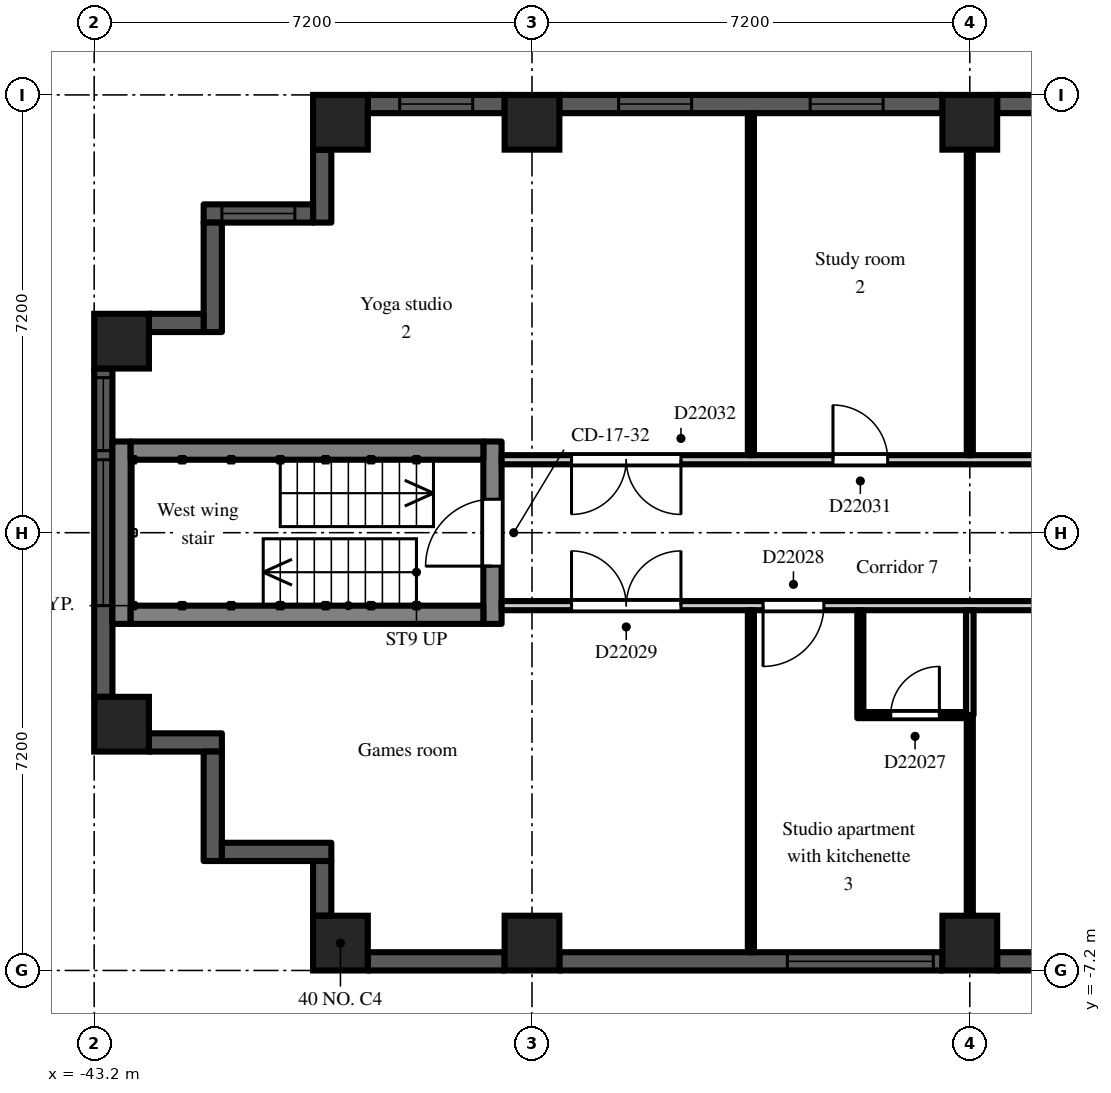
"""IFC4 building model, lengths in metres.
Left out: names, types, materials, properties, quantities, classifications, styles, units other than length and angle.
Written with IfcOpenShell. Run it as: python <this file> out.ifc"""

import sys

from ifc_helpers import new_model, si_unit, direction, frame, frame_2d, origin, origin_2d, place, context, subcontext, project, spatial, rectangle, extrude, element, fill, save


model = new_model("IFC4")
c1 = context("Model", 3, precision=1e-05, world=origin(), true_north=direction((0.0, 1.0)))
c2 = subcontext(c1, "Body", "Model", "MODEL_VIEW")
j1 = project(units=[si_unit("LENGTHUNIT", "METRE"), si_unit("PLANEANGLEUNIT", "RADIAN")], contexts=[c1])
p1 = place(None, origin())
s1 = spatial("IfcSite", under=j1, at=p1, CompositionType="ELEMENT")
p2 = place(p1, origin())
s2 = spatial("IfcBuilding", under=s1, at=p2, CompositionType="ELEMENT")
p3 = place(p2, frame((0.0, 0.0, 156.3)))
s3 = spatial("IfcBuildingStorey", under=s2, at=p3, CompositionType="ELEMENT", Elevation=156.3)
for number, where, z_axis, x_axis in (
    (1, (-42.75, -3.15, 0.0), (0.0, 0.0, 1.0), (1.0, 0.0, 0.0)),
    (2, (-42.75, 3.15, 0.0), (0.0, 0.0, 1.0), (1.0, 0.0, 0.0)),
    (3, (-39.15, -6.75, 0.0), (0.0, 0.0, 1.0), (1.0, 0.0, 0.0)),
    (4, (-39.15, 6.75, 0.0), (0.0, 0.0, 1.0), (1.0, 0.0, 0.0)),
    (5, (-36.0, -6.75, 0.0), (0.0, 0.0, 1.0), (1.0, 0.0, 0.0)),
    (6, (-36.0, 6.75, 0.0), (0.0, 0.0, 1.0), (1.0, 0.0, 0.0)),
    (7, (-28.8, -6.75, 0.0), (0.0, 0.0, 1.0), (1.0, 0.0, 0.0)),
    (8, (-28.8, 6.75, 0.0), (0.0, 0.0, 1.0), (1.0, 0.0, 0.0)),
):
    element("IfcColumn", number, at=place(p3, frame(where, z_axis=z_axis, x_axis=x_axis)), inside=s3, PredefinedType="COLUMN", context=c2, shape_type="SweptSolid", body=[
        extrude(rectangle(XDim=0.9, YDim=0.9, at=origin_2d()), origin(), (0.0, 0.0, 1.0), 3.0),
    ])
p4 = place(p3, frame((-25.2, 7.05, 0.0), z_axis=(0.0, 0.0, 1.0), x_axis=(-1.0, 0.0, 0.0)))
e9 = element("IfcWall", 9, at=p4, inside=s3, PredefinedType="SOLIDWALL", context=c2, shape_type="SweptSolid", body=[
    extrude(rectangle(XDim=3.15, YDim=0.3, at=frame_2d((1.575, 0.0))), origin(), (0.0, 0.0, 1.0), 2.2),
])
p5 = place(p4, frame((0.975, 0.0, 0.2)))
e10 = element("IfcOpeningElement", 10, at=p5, cuts=e9, PredefinedType="OPENING", context=c2, shape_type="SweptSolid", body=[
    extrude(rectangle(XDim=1.2, YDim=1.85, at=frame_2d((0.6, 0.925))), frame((0.0, 0.16, 0.0), z_axis=(0.0, -1.0, 0.0), x_axis=(1.0, 0.0, 0.0)), (0.0, 0.0, 1.0), 0.32),
])
p6 = place(p3, frame((-29.25, 7.05, 0.0), z_axis=(0.0, 0.0, 1.0), x_axis=(-1.0, 0.0, 0.0)))
e11 = element("IfcWall", 11, at=p6, inside=s3, PredefinedType="SOLIDWALL", context=c2, shape_type="SweptSolid", body=[
    extrude(rectangle(XDim=6.3, YDim=0.3, at=frame_2d((3.15, 0.0))), origin(), (0.0, 0.0, 1.0), 2.2),
])
p7 = place(p6, frame((0.975, 0.0, 0.2)))
e12 = element("IfcOpeningElement", 12, at=p7, cuts=e11, PredefinedType="OPENING", context=c2, shape_type="SweptSolid", body=[
    extrude(rectangle(XDim=1.2, YDim=1.85, at=frame_2d((0.6, 0.925))), frame((0.0, 0.16, 0.0), z_axis=(0.0, -1.0, 0.0), x_axis=(1.0, 0.0, 0.0)), (0.0, 0.0, 1.0), 0.32),
])
p8 = place(p6, frame((4.125, 0.0, 0.2)))
e13 = element("IfcOpeningElement", 13, at=p8, cuts=e11, PredefinedType="OPENING", context=c2, shape_type="SweptSolid", body=[
    extrude(rectangle(XDim=1.2, YDim=1.85, at=frame_2d((0.6, 0.925))), frame((0.0, 0.16, 0.0), z_axis=(0.0, -1.0, 0.0), x_axis=(1.0, 0.0, 0.0)), (0.0, 0.0, 1.0), 0.32),
])
p9 = place(p3, frame((-36.45, 7.05, 0.0), z_axis=(0.0, 0.0, 1.0), x_axis=(-1.0, 0.0, 0.0)))
e14 = element("IfcWall", 14, at=p9, inside=s3, PredefinedType="SOLIDWALL", context=c2, shape_type="SweptSolid", body=[
    extrude(rectangle(XDim=2.25, YDim=0.3, at=frame_2d((1.125, 0.0))), origin(), (0.0, 0.0, 1.0), 2.2),
])
p10 = place(p9, frame((0.525, 0.0, 0.2)))
e15 = element("IfcOpeningElement", 15, at=p10, cuts=e14, PredefinedType="OPENING", context=c2, shape_type="SweptSolid", body=[
    extrude(rectangle(XDim=1.2, YDim=1.85, at=frame_2d((0.6, 0.925))), frame((0.0, 0.16, 0.0), z_axis=(0.0, -1.0, 0.0), x_axis=(1.0, 0.0, 0.0)), (0.0, 0.0, 1.0), 0.32),
])
p11 = place(p3, frame((-39.45, 6.3, 0.0), z_axis=(0.0, 0.0, 1.0), x_axis=(0.0, -1.0, 0.0)))
e16 = element("IfcWall", 16, at=p11, inside=s3, PredefinedType="SOLIDWALL", context=c2, shape_type="SweptSolid", body=[
    extrude(rectangle(XDim=1.2, YDim=0.3, at=frame_2d((0.6, 0.0))), origin(), (0.0, 0.0, 1.0), 2.6),
])
p12 = place(p3, frame((-39.6, 5.25, 0.0), z_axis=(0.0, 0.0, 1.0), x_axis=(-1.0, 0.0, 0.0)))
e17 = element("IfcWall", 17, at=p12, inside=s3, PredefinedType="SOLIDWALL", context=c2, shape_type="SweptSolid", body=[
    extrude(rectangle(XDim=1.8, YDim=0.3, at=frame_2d((0.9, 0.0))), origin(), (0.0, 0.0, 1.0), 2.6),
])
p13 = place(p12, frame((0.3, 0.0, 0.2)))
e18 = element("IfcOpeningElement", 18, at=p13, cuts=e17, PredefinedType="OPENING", context=c2, shape_type="SweptSolid", body=[
    extrude(rectangle(XDim=1.2, YDim=1.85, at=frame_2d((0.6, 0.925))), frame((0.0, 0.16, 0.0), z_axis=(0.0, -1.0, 0.0), x_axis=(1.0, 0.0, 0.0)), (0.0, 0.0, 1.0), 0.32),
])
p14 = place(p3, frame((-41.25, 5.1, 0.0), z_axis=(0.0, 0.0, 1.0), x_axis=(0.0, -1.0, 0.0)))
e19 = element("IfcWall", 19, at=p14, inside=s3, PredefinedType="SOLIDWALL", context=c2, shape_type="SweptSolid", body=[
    extrude(rectangle(XDim=1.8, YDim=0.3, at=frame_2d((0.9, 0.0))), origin(), (0.0, 0.0, 1.0), 2.6),
])
p15 = place(p3, frame((-41.4, 3.45, 0.0), z_axis=(0.0, 0.0, 1.0), x_axis=(-1.0, 0.0, 0.0)))
e20 = element("IfcWall", 20, at=p15, inside=s3, PredefinedType="SOLIDWALL", context=c2, shape_type="SweptSolid", body=[
    extrude(rectangle(XDim=0.9, YDim=0.3, at=frame_2d((0.45, 0.0))), origin(), (0.0, 0.0, 1.0), 2.6),
])
p16 = place(p3, frame((-43.05, 2.7, 0.0), z_axis=(0.0, 0.0, 1.0), x_axis=(0.0, -1.0, 0.0)))
e21 = element("IfcWall", 21, at=p16, inside=s3, PredefinedType="SOLIDWALL", context=c2, shape_type="SweptSolid", body=[
    extrude(rectangle(XDim=5.4, YDim=0.3, at=frame_2d((2.7, 0.0))), origin(), (0.0, 0.0, 1.0), 2.2),
])
p17 = place(p16, frame((1.5, 0.0, 0.2)))
e22 = element("IfcOpeningElement", 22, at=p17, cuts=e21, PredefinedType="OPENING", context=c2, shape_type="SweptSolid", body=[
    extrude(rectangle(XDim=2.4, YDim=1.85, at=frame_2d((1.2, 0.925))), frame((0.0, 0.16, 0.0), z_axis=(0.0, -1.0, 0.0), x_axis=(1.0, 0.0, 0.0)), (0.0, 0.0, 1.0), 0.32),
])
p18 = place(p16, frame((0.15, 0.0, 0.2)))
e23 = element("IfcOpeningElement", 23, at=p18, cuts=e21, PredefinedType="OPENING", context=c2, shape_type="SweptSolid", body=[
    extrude(rectangle(XDim=1.2, YDim=1.85, at=frame_2d((0.6, 0.925))), frame((0.0, 0.16, 0.0), z_axis=(0.0, -1.0, 0.0), x_axis=(1.0, 0.0, 0.0)), (0.0, 0.0, 1.0), 0.32),
])
p19 = place(p3, frame((-42.3, -3.45, 0.0), z_axis=(0.0, 0.0, 1.0), x_axis=(1.0, 0.0, 0.0)))
e24 = element("IfcWall", 24, at=p19, inside=s3, PredefinedType="SOLIDWALL", context=c2, shape_type="SweptSolid", body=[
    extrude(rectangle(XDim=1.2, YDim=0.3, at=frame_2d((0.6, 0.0))), origin(), (0.0, 0.0, 1.0), 2.6),
])
p20 = place(p3, frame((-41.25, -3.6, 0.0), z_axis=(0.0, 0.0, 1.0), x_axis=(0.0, -1.0, 0.0)))
e25 = element("IfcWall", 25, at=p20, inside=s3, PredefinedType="SOLIDWALL", context=c2, shape_type="SweptSolid", body=[
    extrude(rectangle(XDim=1.8, YDim=0.3, at=frame_2d((0.9, 0.0))), origin(), (0.0, 0.0, 1.0), 2.6),
])
p21 = place(p3, frame((-41.1, -5.25, 0.0), z_axis=(0.0, 0.0, 1.0), x_axis=(1.0, 0.0, 0.0)))
e26 = element("IfcWall", 26, at=p21, inside=s3, PredefinedType="SOLIDWALL", context=c2, shape_type="SweptSolid", body=[
    extrude(rectangle(XDim=1.8, YDim=0.3, at=frame_2d((0.9, 0.0))), origin(), (0.0, 0.0, 1.0), 2.6),
])
p22 = place(p3, frame((-39.45, -5.4, 0.0), z_axis=(0.0, 0.0, 1.0), x_axis=(0.0, -1.0, 0.0)))
e27 = element("IfcWall", 27, at=p22, inside=s3, PredefinedType="SOLIDWALL", context=c2, shape_type="SweptSolid", body=[
    extrude(rectangle(XDim=0.9, YDim=0.3, at=frame_2d((0.45, 0.0))), origin(), (0.0, 0.0, 1.0), 2.6),
])
p23 = place(p3, frame((-38.7, -7.05, 0.0), z_axis=(0.0, 0.0, 1.0), x_axis=(1.0, 0.0, 0.0)))
e28 = element("IfcWall", 28, at=p23, inside=s3, PredefinedType="SOLIDWALL", context=c2, shape_type="SweptSolid", body=[
    extrude(rectangle(XDim=2.25, YDim=0.3, at=frame_2d((1.125, 0.0))), origin(), (0.0, 0.0, 1.0), 2.2),
])
p24 = place(p3, frame((-35.55, -7.05, 0.0), z_axis=(0.0, 0.0, 1.0), x_axis=(1.0, 0.0, 0.0)))
e29 = element("IfcWall", 29, at=p24, inside=s3, PredefinedType="SOLIDWALL", context=c2, shape_type="SweptSolid", body=[
    extrude(rectangle(XDim=6.3, YDim=0.3, at=frame_2d((3.15, 0.0))), origin(), (0.0, 0.0, 1.0), 2.2),
])
p25 = place(p24, frame((3.75, 0.0, 0.2)))
e30 = element("IfcOpeningElement", 30, at=p25, cuts=e29, PredefinedType="OPENING", context=c2, shape_type="SweptSolid", body=[
    extrude(rectangle(XDim=2.4, YDim=1.85, at=frame_2d((1.2, 0.925))), frame((0.0, 0.16, 0.0), z_axis=(0.0, -1.0, 0.0), x_axis=(1.0, 0.0, 0.0)), (0.0, 0.0, 1.0), 0.32),
])
p26 = place(p3, frame((-28.35, -7.05, 0.0), z_axis=(0.0, 0.0, 1.0), x_axis=(1.0, 0.0, 0.0)))
e31 = element("IfcWall", 31, at=p26, inside=s3, PredefinedType="SOLIDWALL", context=c2, shape_type="SweptSolid", body=[
    extrude(rectangle(XDim=3.15, YDim=0.3, at=frame_2d((1.575, 0.0))), origin(), (0.0, 0.0, 1.0), 2.2),
])
p27 = place(p3, frame((-36.65, -1.5, 0.0), z_axis=(0.0, 0.0, 1.0), x_axis=(0.0, 1.0, 0.0)))
e32 = element("IfcWall", 32, at=p27, inside=s3, PredefinedType="SHEAR", context=c2, shape_type="SweptSolid", body=[
    extrude(rectangle(XDim=3.0, YDim=0.3, at=frame_2d((1.5, 0.0))), origin(), (0.0, 0.0, 1.0), 2.6),
])
p28 = place(p27, frame((0.95, 0.0, 0.0)))
e33 = element("IfcOpeningElement", 33, at=p28, cuts=e32, PredefinedType="OPENING", context=c2, shape_type="SweptSolid", body=[
    extrude(rectangle(XDim=1.1, YDim=2.1, at=frame_2d((0.55, 1.05))), frame((0.0, 0.16, 0.0), z_axis=(0.0, -1.0, 0.0), x_axis=(1.0, 0.0, 0.0)), (0.0, 0.0, 1.0), 0.32),
])
p29 = place(p3, frame((-42.75, -1.5, 0.0), z_axis=(0.0, 0.0, 1.0), x_axis=(0.0, 1.0, 0.0)))
e34 = element("IfcWall", 34, at=p29, inside=s3, PredefinedType="SHEAR", context=c2, shape_type="SweptSolid", body=[
    extrude(rectangle(XDim=3.0, YDim=0.3, at=frame_2d((1.5, 0.0))), origin(), (0.0, 0.0, 1.0), 2.6),
])
for number, where, z_axis, x_axis in (
    (35, (-36.8, -1.35, 0.0), (0.0, 0.0, 1.0), (-1.0, 0.0, 0.0)),
    (36, (-36.8, 1.35, 0.0), (0.0, 0.0, 1.0), (-1.0, 0.0, 0.0)),
):
    element("IfcWall", number, at=place(p3, frame(where, z_axis=z_axis, x_axis=x_axis)), inside=s3, PredefinedType="SHEAR", context=c2, shape_type="SweptSolid", body=[
        extrude(rectangle(XDim=5.8, YDim=0.3, at=frame_2d((2.9, 0.0))), origin(), (0.0, 0.0, 1.0), 2.6),
    ])
p30 = place(p3, frame((-36.5, -1.2, 0.0), z_axis=(0.0, 0.0, 1.0), x_axis=(1.0, 0.0, 0.0)))
e37 = element("IfcWall", 37, at=p30, inside=s3, PredefinedType="PARTITIONING", context=c2, shape_type="SweptSolid", body=[
    extrude(rectangle(XDim=14.9, YDim=0.15, at=frame_2d((7.45, 0.0))), origin(), (0.0, 0.0, 1.0), 2.6),
])
p31 = place(p30, frame((10.4, 0.0, 0.0)))
e38 = element("IfcOpeningElement", 38, at=p31, cuts=e37, PredefinedType="OPENING", context=c2, shape_type="SweptSolid", body=[
    extrude(rectangle(XDim=1.8, YDim=2.1, at=frame_2d((0.9, 1.05))), frame((0.0, 0.085, 0.0), z_axis=(0.0, -1.0, 0.0), x_axis=(1.0, 0.0, 0.0)), (0.0, 0.0, 1.0), 0.17),
])
p32 = place(p30, frame((4.3, 0.0, 0.0)))
e39 = element("IfcOpeningElement", 39, at=p32, cuts=e37, PredefinedType="OPENING", context=c2, shape_type="SweptSolid", body=[
    extrude(rectangle(XDim=1.0, YDim=2.1, at=frame_2d((0.5, 1.05))), frame((0.0, 0.085, 0.0), z_axis=(0.0, -1.0, 0.0), x_axis=(1.0, 0.0, 0.0)), (0.0, 0.0, 1.0), 0.17),
])
p33 = place(p30, frame((1.15, 0.0, 0.0)))
e40 = element("IfcOpeningElement", 40, at=p33, cuts=e37, PredefinedType="OPENING", context=c2, shape_type="SweptSolid", body=[
    extrude(rectangle(XDim=1.8, YDim=2.1, at=frame_2d((0.9, 1.05))), frame((0.0, 0.085, 0.0), z_axis=(0.0, -1.0, 0.0), x_axis=(1.0, 0.0, 0.0)), (0.0, 0.0, 1.0), 0.17),
])
p34 = place(p3, frame((-36.5, 1.2, 0.0), z_axis=(0.0, 0.0, 1.0), x_axis=(1.0, 0.0, 0.0)))
e41 = element("IfcWall", 41, at=p34, inside=s3, PredefinedType="PARTITIONING", context=c2, shape_type="SweptSolid", body=[
    extrude(rectangle(XDim=14.9, YDim=0.15, at=frame_2d((7.45, 0.0))), origin(), (0.0, 0.0, 1.0), 2.6),
])
p35 = place(p34, frame((10.4, 0.0, 0.0)))
e42 = element("IfcOpeningElement", 42, at=p35, cuts=e41, PredefinedType="OPENING", context=c2, shape_type="SweptSolid", body=[
    extrude(rectangle(XDim=1.8, YDim=2.1, at=frame_2d((0.9, 1.05))), frame((0.0, 0.085, 0.0), z_axis=(0.0, -1.0, 0.0), x_axis=(1.0, 0.0, 0.0)), (0.0, 0.0, 1.0), 0.17),
])
p36 = place(p34, frame((5.45, 0.0, 0.0)))
e43 = element("IfcOpeningElement", 43, at=p36, cuts=e41, PredefinedType="OPENING", context=c2, shape_type="SweptSolid", body=[
    extrude(rectangle(XDim=0.9, YDim=2.1, at=frame_2d((0.45, 1.05))), frame((0.0, 0.085, 0.0), z_axis=(0.0, -1.0, 0.0), x_axis=(1.0, 0.0, 0.0)), (0.0, 0.0, 1.0), 0.17),
])
p37 = place(p34, frame((1.15, 0.0, 0.0)))
e44 = element("IfcOpeningElement", 44, at=p37, cuts=e41, PredefinedType="OPENING", context=c2, shape_type="SweptSolid", body=[
    extrude(rectangle(XDim=1.8, YDim=2.1, at=frame_2d((0.9, 1.05))), frame((0.0, 0.085, 0.0), z_axis=(0.0, -1.0, 0.0), x_axis=(1.0, 0.0, 0.0)), (0.0, 0.0, 1.0), 0.17),
])
for number, where, z_axis, x_axis in (
    (45, (-32.4, -6.9, 0.0), (0.0, 0.0, 1.0), (0.0, 1.0, 0.0)),
    (46, (-32.4, 1.275, 0.0), (0.0, 0.0, 1.0), (0.0, 1.0, 0.0)),
):
    element("IfcWall", number, at=place(p3, frame(where, z_axis=z_axis, x_axis=x_axis)), inside=s3, PredefinedType="PARTITIONING", context=c2, shape_type="SweptSolid", body=[
        extrude(rectangle(XDim=5.625, YDim=0.1, at=frame_2d((2.812, 0.0))), origin(), (0.0, 0.0, 1.0), 2.6),
    ])
p38 = place(p3, frame((-30.6, -3.05, 0.0), z_axis=(0.0, 0.0, 1.0), x_axis=(0.0, 1.0, 0.0)))
e47 = element("IfcWall", 47, at=p38, inside=s3, PredefinedType="PARTITIONING", context=c2, shape_type="SweptSolid", body=[
    extrude(rectangle(XDim=1.775, YDim=0.1, at=frame_2d((0.888, 0.0))), origin(), (0.0, 0.0, 1.0), 2.6),
])
p39 = place(p3, frame((-30.55, -3.0, 0.0), z_axis=(0.0, 0.0, 1.0), x_axis=(1.0, 0.0, 0.0)))
e48 = element("IfcWall", 48, at=p39, inside=s3, PredefinedType="PARTITIONING", context=c2, shape_type="SweptSolid", body=[
    extrude(rectangle(XDim=1.688, YDim=0.1, at=frame_2d((0.844, 0.0))), origin(), (0.0, 0.0, 1.0), 2.6),
])
p40 = place(p39, frame((0.45, 0.0, 0.0)))
e49 = element("IfcOpeningElement", 49, at=p40, cuts=e48, PredefinedType="OPENING", context=c2, shape_type="SweptSolid", body=[
    extrude(rectangle(XDim=0.8, YDim=2.1, at=frame_2d((0.4, 1.05))), frame((0.0, 0.06, 0.0), z_axis=(0.0, -1.0, 0.0), x_axis=(1.0, 0.0, 0.0)), (0.0, 0.0, 1.0), 0.12),
])
p41 = place(p3, frame((-28.8, -6.9, 0.0), z_axis=(0.0, 0.0, 1.0), x_axis=(0.0, 1.0, 0.0)))
e50 = element("IfcWall", 50, at=p41, inside=s3, PredefinedType="PARTITIONING", context=c2, shape_type="SweptSolid", body=[
    extrude(rectangle(XDim=3.9, YDim=0.1, at=frame_2d((1.95, 0.0))), origin(), (0.0, 0.0, 1.0), 2.6),
])
p42 = place(p3, frame((-28.8, -3.0, 0.0), z_axis=(0.0, 0.0, 1.0), x_axis=(0.0, 1.0, 0.0)))
e51 = element("IfcWall", 51, at=p42, inside=s3, PredefinedType="PARTITIONING", context=c2, shape_type="SweptSolid", body=[
    extrude(rectangle(XDim=1.725, YDim=0.125, at=frame_2d((0.863, 0.0))), origin(), (0.0, 0.0, 1.0), 2.6),
])
p43 = place(p3, frame((-28.8, 1.275, 0.0), z_axis=(0.0, 0.0, 1.0), x_axis=(0.0, 1.0, 0.0)))
e52 = element("IfcWall", 52, at=p43, inside=s3, PredefinedType="PARTITIONING", context=c2, shape_type="SweptSolid", body=[
    extrude(rectangle(XDim=5.625, YDim=0.1, at=frame_2d((2.812, 0.0))), origin(), (0.0, 0.0, 1.0), 2.6),
])
p44 = place(p7, origin())
e53 = element("IfcWindow", 53, at=p44, inside=s3, PartitioningType="SINGLE_PANEL", PredefinedType="WINDOW", context=c2, shape_type="SweptSolid", body=[
    extrude(rectangle(XDim=1.2, YDim=1.85, at=frame_2d((0.6, 0.925))), frame((0.0, 0.03, 0.0), z_axis=(0.0, -1.0, 0.0), x_axis=(1.0, 0.0, 0.0)), (0.0, 0.0, 1.0), 0.06),
])
fill(e12, e53)
p45 = place(p8, origin())
e54 = element("IfcWindow", 54, at=p45, inside=s3, PartitioningType="SINGLE_PANEL", PredefinedType="WINDOW", context=c2, shape_type="SweptSolid", body=[
    extrude(rectangle(XDim=1.2, YDim=1.85, at=frame_2d((0.6, 0.925))), frame((0.0, 0.03, 0.0), z_axis=(0.0, -1.0, 0.0), x_axis=(1.0, 0.0, 0.0)), (0.0, 0.0, 1.0), 0.06),
])
fill(e13, e54)
p46 = place(p10, origin())
e55 = element("IfcWindow", 55, at=p46, inside=s3, PartitioningType="SINGLE_PANEL", PredefinedType="WINDOW", context=c2, shape_type="SweptSolid", body=[
    extrude(rectangle(XDim=1.2, YDim=1.85, at=frame_2d((0.6, 0.925))), frame((0.0, 0.03, 0.0), z_axis=(0.0, -1.0, 0.0), x_axis=(1.0, 0.0, 0.0)), (0.0, 0.0, 1.0), 0.06),
])
fill(e15, e55)
p47 = place(p13, origin())
e56 = element("IfcWindow", 56, at=p47, inside=s3, PartitioningType="SINGLE_PANEL", PredefinedType="WINDOW", context=c2, shape_type="SweptSolid", body=[
    extrude(rectangle(XDim=1.2, YDim=1.85, at=frame_2d((0.6, 0.925))), frame((0.0, 0.03, 0.0), z_axis=(0.0, -1.0, 0.0), x_axis=(1.0, 0.0, 0.0)), (0.0, 0.0, 1.0), 0.06),
])
fill(e18, e56)
p48 = place(p17, origin())
e57 = element("IfcWindow", 57, at=p48, inside=s3, PartitioningType="SINGLE_PANEL", PredefinedType="WINDOW", context=c2, shape_type="SweptSolid", body=[
    extrude(rectangle(XDim=2.4, YDim=1.85, at=frame_2d((1.2, 0.925))), frame((0.0, 0.03, 0.0), z_axis=(0.0, -1.0, 0.0), x_axis=(1.0, 0.0, 0.0)), (0.0, 0.0, 1.0), 0.06),
])
fill(e22, e57)
p49 = place(p18, origin())
e58 = element("IfcWindow", 58, at=p49, inside=s3, PartitioningType="SINGLE_PANEL", PredefinedType="WINDOW", context=c2, shape_type="SweptSolid", body=[
    extrude(rectangle(XDim=1.2, YDim=1.85, at=frame_2d((0.6, 0.925))), frame((0.0, 0.03, 0.0), z_axis=(0.0, -1.0, 0.0), x_axis=(1.0, 0.0, 0.0)), (0.0, 0.0, 1.0), 0.06),
])
fill(e23, e58)
p50 = place(p25, origin())
e59 = element("IfcWindow", 59, at=p50, inside=s3, PartitioningType="SINGLE_PANEL", PredefinedType="WINDOW", context=c2, shape_type="SweptSolid", body=[
    extrude(rectangle(XDim=2.4, YDim=1.85, at=frame_2d((1.2, 0.925))), frame((0.0, 0.03, 0.0), z_axis=(0.0, -1.0, 0.0), x_axis=(1.0, 0.0, 0.0)), (0.0, 0.0, 1.0), 0.06),
])
fill(e30, e59)
p51 = place(p28, origin())
e60 = element("IfcDoor", 60, at=p51, inside=s3, OperationType="SINGLE_SWING_LEFT", PredefinedType="DOOR", context=c2, shape_type="SweptSolid", body=[
    extrude(rectangle(XDim=1.1, YDim=2.1, at=frame_2d((0.55, 1.05))), frame((0.0, 0.025, 0.0), z_axis=(0.0, -1.0, 0.0), x_axis=(1.0, 0.0, 0.0)), (0.0, 0.0, 1.0), 0.05),
])
fill(e33, e60)
p52 = place(p40, origin())
e61 = element("IfcDoor", 61, at=p52, inside=s3, OperationType="SINGLE_SWING_RIGHT", PredefinedType="DOOR", context=c2, shape_type="SweptSolid", body=[
    extrude(rectangle(XDim=0.8, YDim=2.1, at=frame_2d((0.4, 1.05))), frame((0.0, 0.025, 0.0), z_axis=(0.0, -1.0, 0.0), x_axis=(1.0, 0.0, 0.0)), (0.0, 0.0, 1.0), 0.05),
])
fill(e49, e61)
p53 = place(p32, frame((1.0, 0.0, 0.0), z_axis=(0.0, 0.0, 1.0), x_axis=(-1.0, 0.0, 0.0)))
e62 = element("IfcDoor", 62, at=p53, inside=s3, OperationType="SINGLE_SWING_RIGHT", PredefinedType="DOOR", context=c2, shape_type="SweptSolid", body=[
    extrude(rectangle(XDim=1.0, YDim=2.1, at=frame_2d((0.5, 1.05))), frame((0.0, 0.025, 0.0), z_axis=(0.0, -1.0, 0.0), x_axis=(1.0, 0.0, 0.0)), (0.0, 0.0, 1.0), 0.05),
])
fill(e39, e62)
p54 = place(p33, origin())
e63 = element("IfcDoor", 63, at=p54, inside=s3, OperationType="DOUBLE_DOOR_DOUBLE_SWING", PredefinedType="DOOR", context=c2, shape_type="SweptSolid", body=[
    extrude(rectangle(XDim=1.8, YDim=2.1, at=frame_2d((0.9, 1.05))), frame((0.0, 0.025, 0.0), z_axis=(0.0, -1.0, 0.0), x_axis=(1.0, 0.0, 0.0)), (0.0, 0.0, 1.0), 0.05),
])
fill(e40, e63)
p55 = place(p36, origin())
e64 = element("IfcDoor", 64, at=p55, inside=s3, OperationType="SINGLE_SWING_LEFT", PredefinedType="DOOR", context=c2, shape_type="SweptSolid", body=[
    extrude(rectangle(XDim=0.9, YDim=2.1, at=frame_2d((0.45, 1.05))), frame((0.0, 0.025, 0.0), z_axis=(0.0, -1.0, 0.0), x_axis=(1.0, 0.0, 0.0)), (0.0, 0.0, 1.0), 0.05),
])
fill(e43, e64)
p56 = place(p37, frame((1.8, 0.0, 0.0), z_axis=(0.0, 0.0, 1.0), x_axis=(-1.0, 0.0, 0.0)))
e65 = element("IfcDoor", 65, at=p56, inside=s3, OperationType="DOUBLE_DOOR_DOUBLE_SWING", PredefinedType="DOOR", context=c2, shape_type="SweptSolid", body=[
    extrude(rectangle(XDim=1.8, YDim=2.1, at=frame_2d((0.9, 1.05))), frame((0.0, 0.025, 0.0), z_axis=(0.0, -1.0, 0.0), x_axis=(1.0, 0.0, 0.0)), (0.0, 0.0, 1.0), 0.05),
])
fill(e44, e65)
save(model, sys.argv[1])
